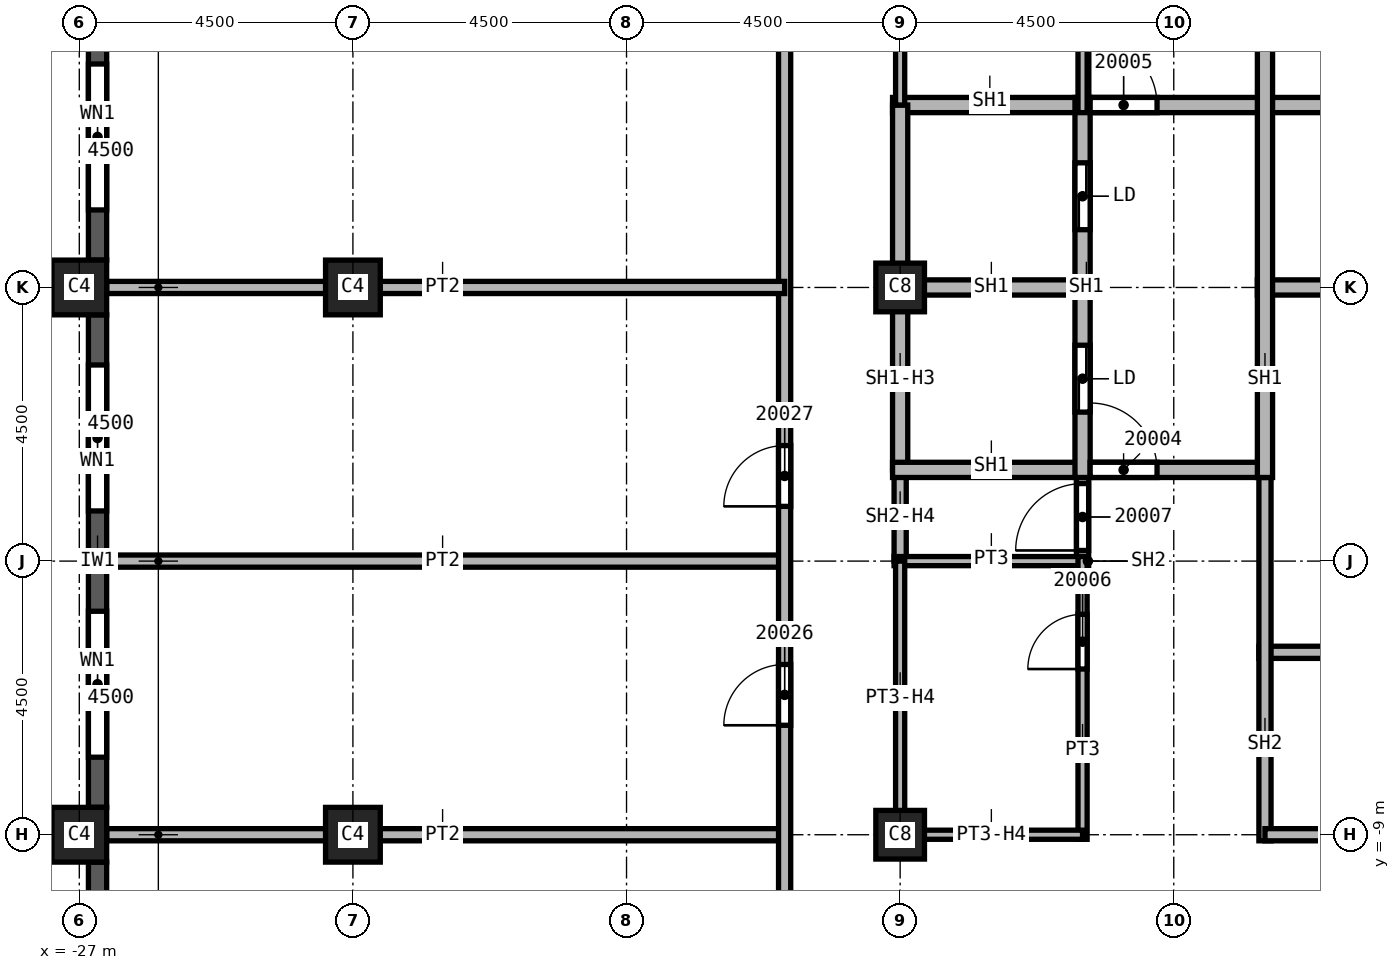
"""IFC4 building model, lengths in metres.
Left out: names, types, materials, properties, quantities, classifications, styles, units other than length and angle.
Written with IfcOpenShell. Run it as: python <this file> out.ifc"""

import sys

from ifc_helpers import new_model, si_unit, direction, frame, frame_2d, origin, origin_2d, place, context, subcontext, project, spatial, rectangle, extrude, element, fill, save


model = new_model("IFC4")
c1 = context("Model", 3, precision=1e-05, world=origin(), true_north=direction((0.0, 1.0)))
c2 = subcontext(c1, "Body", "Model", "MODEL_VIEW")
j1 = project(units=[si_unit("LENGTHUNIT", "METRE"), si_unit("PLANEANGLEUNIT", "RADIAN")], contexts=[c1])
p1 = place(None, origin())
s1 = spatial("IfcSite", under=j1, at=p1, CompositionType="ELEMENT")
p2 = place(p1, origin())
s2 = spatial("IfcBuilding", under=s1, at=p2, CompositionType="ELEMENT")
p3 = place(p2, frame((0.0, 0.0, 286.0)))
s3 = spatial("IfcBuildingStorey", under=s2, at=p3, CompositionType="ELEMENT", Elevation=286.0)
for number, where, z_axis, x_axis in (
    (1, (-22.5, 0.0, 0.0), (0.0, 0.0, 1.0), (1.0, 0.0, 0.0)),
    (2, (-22.5, -9.0, 0.0), (0.0, 0.0, 1.0), (1.0, 0.0, 0.0)),
):
    element("IfcColumn", number, at=place(p3, frame(where, z_axis=z_axis, x_axis=x_axis)), inside=s3, PredefinedType="COLUMN", context=c2, shape_type="SweptSolid", body=[
        extrude(rectangle(XDim=0.9, YDim=0.9, at=origin_2d()), origin(), (0.0, 0.0, 1.0), 3.72),
    ])
for number, where, z_axis, x_axis in (
    (3, (-13.5, 0.0, 0.0), (0.0, 0.0, 1.0), (1.0, 0.0, 0.0)),
    (4, (-13.5, -9.0, 0.0), (0.0, 0.0, 1.0), (1.0, 0.0, 0.0)),
):
    element("IfcColumn", number, at=place(p3, frame(where, z_axis=z_axis, x_axis=x_axis)), inside=s3, PredefinedType="COLUMN", context=c2, shape_type="SweptSolid", body=[
        extrude(rectangle(XDim=0.8, YDim=0.8, at=origin_2d()), origin(), (0.0, 0.0, 1.0), 3.72),
    ])
for number, where, z_axis, x_axis in (
    (5, (-27.0, 0.0, 0.0), (0.0, 0.0, 1.0), (0.0, 1.0, 0.0)),
    (6, (-27.0, -9.0, 0.0), (0.0, 0.0, 1.0), (0.0, 1.0, 0.0)),
):
    element("IfcColumn", number, at=place(p3, frame(where, z_axis=z_axis, x_axis=x_axis)), inside=s3, PredefinedType="COLUMN", context=c2, shape_type="SweptSolid", body=[
        extrude(rectangle(XDim=0.9, YDim=0.9, at=origin_2d()), origin(), (0.0, 0.0, 1.0), 3.72),
    ])
p4 = place(p3, frame((-26.7, 8.55, 0.0), z_axis=(0.0, 0.0, 1.0), x_axis=(0.0, -1.0, 0.0)))
e7 = element("IfcWall", 7, at=p4, inside=s3, PredefinedType="SOLIDWALL", context=c2, shape_type="SweptSolid", body=[
    extrude(rectangle(XDim=8.1, YDim=0.3, at=frame_2d((4.05, 0.0))), origin(), (0.0, 0.0, 1.0), 3.12),
])
p5 = place(p4, frame((0.825, 0.0, 0.8)))
e8 = element("IfcOpeningElement", 8, at=p5, cuts=e7, PredefinedType="OPENING", context=c2, shape_type="SweptSolid", body=[
    extrude(rectangle(XDim=2.4, YDim=1.95, at=frame_2d((1.2, 0.975))), frame((0.0, 0.15, 0.0), z_axis=(0.0, -1.0, 0.0), x_axis=(1.0, 0.0, 0.0)), (0.0, 0.0, 1.0), 0.3),
])
p6 = place(p4, frame((4.875, 0.0, 0.8)))
e9 = element("IfcOpeningElement", 9, at=p6, cuts=e7, PredefinedType="OPENING", context=c2, shape_type="SweptSolid", body=[
    extrude(rectangle(XDim=2.4, YDim=1.95, at=frame_2d((1.2, 0.975))), frame((0.0, 0.15, 0.0), z_axis=(0.0, -1.0, 0.0), x_axis=(1.0, 0.0, 0.0)), (0.0, 0.0, 1.0), 0.3),
])
p7 = place(p3, frame((-26.7, -0.45, 0.0), z_axis=(0.0, 0.0, 1.0), x_axis=(0.0, -1.0, 0.0)))
e10 = element("IfcWall", 10, at=p7, inside=s3, PredefinedType="SOLIDWALL", context=c2, shape_type="SweptSolid", body=[
    extrude(rectangle(XDim=8.1, YDim=0.3, at=frame_2d((4.05, 0.0))), origin(), (0.0, 0.0, 1.0), 3.12),
])
p8 = place(p7, frame((0.825, 0.0, 0.8)))
e11 = element("IfcOpeningElement", 11, at=p8, cuts=e10, PredefinedType="OPENING", context=c2, shape_type="SweptSolid", body=[
    extrude(rectangle(XDim=2.4, YDim=1.95, at=frame_2d((1.2, 0.975))), frame((0.0, 0.15, 0.0), z_axis=(0.0, -1.0, 0.0), x_axis=(1.0, 0.0, 0.0)), (0.0, 0.0, 1.0), 0.3),
])
p9 = place(p7, frame((4.875, 0.0, 0.8)))
e12 = element("IfcOpeningElement", 12, at=p9, cuts=e10, PredefinedType="OPENING", context=c2, shape_type="SweptSolid", body=[
    extrude(rectangle(XDim=2.4, YDim=1.95, at=frame_2d((1.2, 0.975))), frame((0.0, 0.15, 0.0), z_axis=(0.0, -1.0, 0.0), x_axis=(1.0, 0.0, 0.0)), (0.0, 0.0, 1.0), 0.3),
])
p10 = place(p3, frame((-26.7, -9.45, 0.0), z_axis=(0.0, 0.0, 1.0), x_axis=(0.0, -1.0, 0.0)))
e13 = element("IfcWall", 13, at=p10, inside=s3, PredefinedType="SOLIDWALL", context=c2, shape_type="SweptSolid", body=[
    extrude(rectangle(XDim=8.1, YDim=0.3, at=frame_2d((4.05, 0.0))), origin(), (0.0, 0.0, 1.0), 3.12),
])
p11 = place(p10, frame((0.825, 0.0, 0.8)))
e14 = element("IfcOpeningElement", 14, at=p11, cuts=e13, PredefinedType="OPENING", context=c2, shape_type="SweptSolid", body=[
    extrude(rectangle(XDim=2.4, YDim=1.95, at=frame_2d((1.2, 0.975))), frame((0.0, 0.15, 0.0), z_axis=(0.0, -1.0, 0.0), x_axis=(1.0, 0.0, 0.0)), (0.0, 0.0, 1.0), 0.3),
])
p12 = place(p10, frame((4.875, 0.0, 0.8)))
e15 = element("IfcOpeningElement", 15, at=p12, cuts=e13, PredefinedType="OPENING", context=c2, shape_type="SweptSolid", body=[
    extrude(rectangle(XDim=2.4, YDim=1.95, at=frame_2d((1.2, 0.975))), frame((0.0, 0.15, 0.0), z_axis=(0.0, -1.0, 0.0), x_axis=(1.0, 0.0, 0.0)), (0.0, 0.0, 1.0), 0.3),
])
for number, where, z_axis, x_axis in (
    (16, (-26.55, -9.0, 0.0), (0.0, 0.0, 1.0), (1.0, 0.0, 0.0)),
    (17, (-26.55, -4.5, 0.0), (0.0, 0.0, 1.0), (1.0, 0.0, 0.0)),
):
    element("IfcWall", number, at=place(p3, frame(where, z_axis=z_axis, x_axis=x_axis)), inside=s3, PredefinedType="PARTITIONING", context=c2, shape_type="SweptSolid", body=[
        extrude(rectangle(XDim=11.15, YDim=0.2, at=frame_2d((5.575, 0.0))), origin(), (0.0, 0.0, 1.0), 3.72),
    ])
p13 = place(p3, frame((-15.4, -21.9, 0.0), z_axis=(0.0, 0.0, 1.0), x_axis=(0.0, 1.0, 0.0)))
e18 = element("IfcWall", 18, at=p13, inside=s3, PredefinedType="PARTITIONING", context=c2, shape_type="SweptSolid", body=[
    extrude(rectangle(XDim=35.5, YDim=0.2, at=frame_2d((17.75, 0.0))), origin(), (0.0, 0.0, 1.0), 3.72),
])
p14 = place(p13, frame((30.9, 0.0, 0.0)))
e19 = element("IfcOpeningElement", 19, at=p14, cuts=e18, PredefinedType="OPENING", context=c2, shape_type="SweptSolid", body=[
    extrude(rectangle(XDim=1.0, YDim=2.1, at=frame_2d((0.5, 1.05))), frame((0.0, 0.1, 0.0), z_axis=(0.0, -1.0, 0.0), x_axis=(1.0, 0.0, 0.0)), (0.0, 0.0, 1.0), 0.2),
])
p15 = place(p13, frame((2.65, 0.0, 0.0)))
e20 = element("IfcOpeningElement", 20, at=p15, cuts=e18, PredefinedType="OPENING", context=c2, shape_type="SweptSolid", body=[
    extrude(rectangle(XDim=1.0, YDim=2.1, at=frame_2d((0.5, 1.05))), frame((0.0, 0.1, 0.0), z_axis=(0.0, -1.0, 0.0), x_axis=(1.0, 0.0, 0.0)), (0.0, 0.0, 1.0), 0.2),
])
p16 = place(p13, frame((7.65, 0.0, 0.0)))
e21 = element("IfcOpeningElement", 21, at=p16, cuts=e18, PredefinedType="OPENING", context=c2, shape_type="SweptSolid", body=[
    extrude(rectangle(XDim=1.0, YDim=2.1, at=frame_2d((0.5, 1.05))), frame((0.0, 0.1, 0.0), z_axis=(0.0, -1.0, 0.0), x_axis=(1.0, 0.0, 0.0)), (0.0, 0.0, 1.0), 0.2),
])
p17 = place(p13, frame((14.7, 0.0, 0.0)))
e22 = element("IfcOpeningElement", 22, at=p17, cuts=e18, PredefinedType="OPENING", context=c2, shape_type="SweptSolid", body=[
    extrude(rectangle(XDim=1.0, YDim=2.1, at=frame_2d((0.5, 1.05))), frame((0.0, 0.1, 0.0), z_axis=(0.0, -1.0, 0.0), x_axis=(1.0, 0.0, 0.0)), (0.0, 0.0, 1.0), 0.2),
])
p18 = place(p13, frame((18.3, 0.0, 0.0)))
e23 = element("IfcOpeningElement", 23, at=p18, cuts=e18, PredefinedType="OPENING", context=c2, shape_type="SweptSolid", body=[
    extrude(rectangle(XDim=1.0, YDim=2.1, at=frame_2d((0.5, 1.05))), frame((0.0, 0.1, 0.0), z_axis=(0.0, -1.0, 0.0), x_axis=(1.0, 0.0, 0.0)), (0.0, 0.0, 1.0), 0.2),
])
p19 = place(p3, frame((-15.4, 0.0, 0.0), z_axis=(0.0, 0.0, 1.0), x_axis=(-1.0, 0.0, 0.0)))
e24 = element("IfcWall", 24, at=p19, inside=s3, PredefinedType="PARTITIONING", context=c2, shape_type="SweptSolid", body=[
    extrude(rectangle(XDim=11.15, YDim=0.2, at=frame_2d((5.575, 0.0))), origin(), (0.0, 0.0, 1.0), 3.72),
])
p20 = place(p3, frame((-13.5, -4.5, 0.0), z_axis=(0.0, 0.0, 1.0), x_axis=(0.0, 1.0, 0.0)))
e25 = element("IfcWall", 25, at=p20, inside=s3, PredefinedType="SOLIDWALL", context=c2, shape_type="SweptSolid", body=[
    extrude(rectangle(XDim=1.5, YDim=0.2, at=frame_2d((0.75, 0.0))), origin(), (0.0, 0.0, 1.0), 3.042),
])
p21 = place(p3, frame((-10.5, -4.575, 0.0), z_axis=(0.0, 0.0, 1.0), x_axis=(0.0, 1.0, 0.0)))
e26 = element("IfcWall", 26, at=p21, inside=s3, PredefinedType="SOLIDWALL", context=c2, shape_type="SweptSolid", body=[
    extrude(rectangle(XDim=1.7, YDim=0.2, at=frame_2d((0.85, 0.0))), origin(), (0.0, 0.0, 1.0), 3.72),
])
p22 = place(p21, frame((0.25, 0.0, 0.0)))
e27 = element("IfcOpeningElement", 27, at=p22, cuts=e26, PredefinedType="OPENING", context=c2, shape_type="SweptSolid", body=[
    extrude(rectangle(XDim=1.1, YDim=2.1, at=frame_2d((0.55, 1.05))), frame((0.0, 0.1, 0.0), z_axis=(0.0, -1.0, 0.0), x_axis=(1.0, 0.0, 0.0)), (0.0, 0.0, 1.0), 0.2),
])
p23 = place(p3, frame((-7.6, -6.0, 0.0), z_axis=(0.0, 0.0, 1.0), x_axis=(1.0, 0.0, 0.0)))
e28 = element("IfcWall", 28, at=p23, inside=s3, PredefinedType="SOLIDWALL", context=c2, shape_type="SweptSolid", body=[
    extrude(rectangle(XDim=3.2, YDim=0.2, at=frame_2d((1.6, 0.0))), origin(), (0.0, 0.0, 1.0), 3.72),
])
p24 = place(p3, frame((-7.5, -9.1, 0.0), z_axis=(0.0, 0.0, 1.0), x_axis=(0.0, 1.0, 0.0)))
e29 = element("IfcWall", 29, at=p24, inside=s3, PredefinedType="SOLIDWALL", context=c2, shape_type="SweptSolid", body=[
    extrude(rectangle(XDim=6.225, YDim=0.2, at=frame_2d((3.113, 0.0))), origin(), (0.0, 0.0, 1.0), 3.72),
])
p25 = place(p3, frame((-4.5, -9.0, 0.0), z_axis=(0.0, 0.0, 1.0), x_axis=(-1.0, 0.0, 0.0)))
e30 = element("IfcWall", 30, at=p25, inside=s3, PredefinedType="SOLIDWALL", context=c2, shape_type="SweptSolid", body=[
    extrude(rectangle(XDim=3.0, YDim=0.2, at=frame_2d((1.5, 0.0))), origin(), (0.0, 0.0, 1.0), 3.042),
])
p26 = place(p3, frame((-13.625, 0.0, 0.0), z_axis=(0.0, 0.0, 1.0), x_axis=(1.0, 0.0, 0.0)))
e31 = element("IfcWall", 31, at=p26, inside=s3, PredefinedType="SOLIDWALL", context=c2, shape_type="SweptSolid", body=[
    extrude(rectangle(XDim=3.125, YDim=0.25, at=frame_2d((1.562, 0.0))), origin(), (0.0, 0.0, 1.0), 3.72),
])
p27 = place(p3, frame((-13.625, 3.0, 0.0), z_axis=(0.0, 0.0, 1.0), x_axis=(1.0, 0.0, 0.0)))
e32 = element("IfcWall", 32, at=p27, inside=s3, PredefinedType="SOLIDWALL", context=c2, shape_type="SweptSolid", body=[
    extrude(rectangle(XDim=9.25, YDim=0.25, at=frame_2d((4.625, 0.0))), origin(), (0.0, 0.0, 1.0), 3.72),
])
p28 = place(p27, frame((3.25, 0.0, 0.0)))
e33 = element("IfcOpeningElement", 33, at=p28, cuts=e32, PredefinedType="OPENING", context=c2, shape_type="SweptSolid", body=[
    extrude(rectangle(XDim=1.1, YDim=2.1, at=frame_2d((0.55, 1.05))), frame((0.0, 0.125, 0.0), z_axis=(0.0, -1.0, 0.0), x_axis=(1.0, 0.0, 0.0)), (0.0, 0.0, 1.0), 0.25),
])
p29 = place(p3, frame((-13.5, -3.0, 0.0), z_axis=(0.0, 0.0, 1.0), x_axis=(0.0, 1.0, 0.0)))
e34 = element("IfcWall", 34, at=p29, inside=s3, PredefinedType="SOLIDWALL", context=c2, shape_type="SweptSolid", body=[
    extrude(rectangle(XDim=6.0, YDim=0.25, at=frame_2d((3.0, 0.0))), origin(), (0.0, 0.0, 1.0), 3.042),
])
p30 = place(p3, frame((-13.625, -3.0, 0.0), z_axis=(0.0, 0.0, 1.0), x_axis=(1.0, 0.0, 0.0)))
e35 = element("IfcWall", 35, at=p30, inside=s3, PredefinedType="SOLIDWALL", context=c2, shape_type="SweptSolid", body=[
    extrude(rectangle(XDim=6.125, YDim=0.25, at=frame_2d((3.062, 0.0))), origin(), (0.0, 0.0, 1.0), 3.72),
])
p31 = place(p30, frame((3.25, 0.0, 0.0)))
e36 = element("IfcOpeningElement", 36, at=p31, cuts=e35, PredefinedType="OPENING", context=c2, shape_type="SweptSolid", body=[
    extrude(rectangle(XDim=1.1, YDim=2.1, at=frame_2d((0.55, 1.05))), frame((0.0, 0.125, 0.0), z_axis=(0.0, -1.0, 0.0), x_axis=(1.0, 0.0, 0.0)), (0.0, 0.0, 1.0), 0.25),
])
p32 = place(p3, frame((-10.5, -3.125, 0.0), z_axis=(0.0, 0.0, 1.0), x_axis=(0.0, 1.0, 0.0)))
e37 = element("IfcWall", 37, at=p32, inside=s3, PredefinedType="SOLIDWALL", context=c2, shape_type="SweptSolid", body=[
    extrude(rectangle(XDim=6.25, YDim=0.25, at=frame_2d((3.125, 0.0))), origin(), (0.0, 0.0, 1.0), 3.72),
])
p33 = place(p32, frame((1.075, 0.0, 0.0)))
e38 = element("IfcOpeningElement", 38, at=p33, cuts=e37, PredefinedType="OPENING", context=c2, shape_type="SweptSolid", body=[
    extrude(rectangle(XDim=1.1, YDim=2.1, at=frame_2d((0.55, 1.05))), frame((0.0, 0.125, 0.0), z_axis=(0.0, -1.0, 0.0), x_axis=(1.0, 0.0, 0.0)), (0.0, 0.0, 1.0), 0.25),
])
p34 = place(p32, frame((4.075, 0.0, 0.0)))
e39 = element("IfcOpeningElement", 39, at=p34, cuts=e37, PredefinedType="OPENING", context=c2, shape_type="SweptSolid", body=[
    extrude(rectangle(XDim=1.1, YDim=2.1, at=frame_2d((0.55, 1.05))), frame((0.0, 0.125, 0.0), z_axis=(0.0, -1.0, 0.0), x_axis=(1.0, 0.0, 0.0)), (0.0, 0.0, 1.0), 0.25),
])
p35 = place(p3, frame((-7.625, 0.0, 0.0), z_axis=(0.0, 0.0, 1.0), x_axis=(1.0, 0.0, 0.0)))
e40 = element("IfcWall", 40, at=p35, inside=s3, PredefinedType="SOLIDWALL", context=c2, shape_type="SweptSolid", body=[
    extrude(rectangle(XDim=3.25, YDim=0.25, at=frame_2d((1.625, 0.0))), origin(), (0.0, 0.0, 1.0), 3.72),
])
p36 = place(p3, frame((-7.5, -3.125, 0.0), z_axis=(0.0, 0.0, 1.0), x_axis=(0.0, 1.0, 0.0)))
e41 = element("IfcWall", 41, at=p36, inside=s3, PredefinedType="SOLIDWALL", context=c2, shape_type="SweptSolid", body=[
    extrude(rectangle(XDim=9.125, YDim=0.25, at=frame_2d((4.562, 0.0))), origin(), (0.0, 0.0, 1.0), 3.72),
])
p37 = place(p3, frame((-13.6, -4.5, 0.0), z_axis=(0.0, 0.0, 1.0), x_axis=(1.0, 0.0, 0.0)))
e42 = element("IfcWall", 42, at=p37, inside=s3, PredefinedType="PARTITIONING", context=c2, shape_type="SweptSolid", body=[
    extrude(rectangle(XDim=3.1, YDim=0.15, at=frame_2d((1.55, 0.0))), origin(), (0.0, 0.0, 1.0), 3.72),
])
p38 = place(p3, frame((-13.5, -9.075, 0.0), z_axis=(0.0, 0.0, 1.0), x_axis=(0.0, 1.0, 0.0)))
e43 = element("IfcWall", 43, at=p38, inside=s3, PredefinedType="PARTITIONING", context=c2, shape_type="SweptSolid", body=[
    extrude(rectangle(XDim=4.575, YDim=0.15, at=frame_2d((2.288, 0.0))), origin(), (0.0, 0.0, 1.0), 3.042),
])
p39 = place(p3, frame((-13.5, 3.0, 0.0), z_axis=(0.0, 0.0, 1.0), x_axis=(0.0, 1.0, 0.0)))
e44 = element("IfcWall", 44, at=p39, inside=s3, PredefinedType="PARTITIONING", context=c2, shape_type="SweptSolid", body=[
    extrude(rectangle(XDim=6.075, YDim=0.15, at=frame_2d((3.038, 0.0))), origin(), (0.0, 0.0, 1.0), 3.042),
])
p40 = place(p3, frame((-10.5, -9.075, 0.0), z_axis=(0.0, 0.0, 1.0), x_axis=(0.0, 1.0, 0.0)))
e45 = element("IfcWall", 45, at=p40, inside=s3, PredefinedType="PARTITIONING", context=c2, shape_type="SweptSolid", body=[
    extrude(rectangle(XDim=4.65, YDim=0.15, at=frame_2d((2.325, 0.0))), origin(), (0.0, 0.0, 1.0), 3.72),
])
p41 = place(p40, frame((2.8, 0.0, 0.0)))
e46 = element("IfcOpeningElement", 46, at=p41, cuts=e45, PredefinedType="OPENING", context=c2, shape_type="SweptSolid", body=[
    extrude(rectangle(XDim=0.9, YDim=2.1, at=frame_2d((0.45, 1.05))), frame((0.0, 0.075, 0.0), z_axis=(0.0, -1.0, 0.0), x_axis=(1.0, 0.0, 0.0)), (0.0, 0.0, 1.0), 0.15),
])
p42 = place(p3, frame((-10.5, -9.0, 0.0), z_axis=(0.0, 0.0, 1.0), x_axis=(-1.0, 0.0, 0.0)))
e47 = element("IfcWall", 47, at=p42, inside=s3, PredefinedType="PARTITIONING", context=c2, shape_type="SweptSolid", body=[
    extrude(rectangle(XDim=3.0, YDim=0.15, at=frame_2d((1.5, 0.0))), origin(), (0.0, 0.0, 1.0), 3.042),
])
p43 = place(p3, frame((-10.5, 2.875, 0.0), z_axis=(0.0, 0.0, 1.0), x_axis=(0.0, 1.0, 0.0)))
e48 = element("IfcWall", 48, at=p43, inside=s3, PredefinedType="PARTITIONING", context=c2, shape_type="SweptSolid", body=[
    extrude(rectangle(XDim=6.2, YDim=0.15, at=frame_2d((3.1, 0.0))), origin(), (0.0, 0.0, 1.0), 3.72),
])
p44 = place(p43, frame((1.75, 0.0, 0.0)))
e49 = element("IfcOpeningElement", 49, at=p44, cuts=e48, PredefinedType="OPENING", context=c2, shape_type="SweptSolid", body=[
    extrude(rectangle(XDim=0.9, YDim=2.1, at=frame_2d((0.45, 1.05))), frame((0.0, 0.075, 0.0), z_axis=(0.0, -1.0, 0.0), x_axis=(1.0, 0.0, 0.0)), (0.0, 0.0, 1.0), 0.15),
])
p45 = place(p6, origin())
e50 = element("IfcWindow", 50, at=p45, inside=s3, PartitioningType="SINGLE_PANEL", PredefinedType="WINDOW", context=c2, shape_type="SweptSolid", body=[
    extrude(rectangle(XDim=2.4, YDim=1.95, at=frame_2d((1.2, 0.975))), frame((0.0, 0.03, 0.0), z_axis=(0.0, -1.0, 0.0), x_axis=(1.0, 0.0, 0.0)), (0.0, 0.0, 1.0), 0.06),
])
fill(e9, e50)
p46 = place(p8, origin())
e51 = element("IfcWindow", 51, at=p46, inside=s3, PartitioningType="SINGLE_PANEL", PredefinedType="WINDOW", context=c2, shape_type="SweptSolid", body=[
    extrude(rectangle(XDim=2.4, YDim=1.95, at=frame_2d((1.2, 0.975))), frame((0.0, 0.03, 0.0), z_axis=(0.0, -1.0, 0.0), x_axis=(1.0, 0.0, 0.0)), (0.0, 0.0, 1.0), 0.06),
])
fill(e11, e51)
p47 = place(p9, origin())
e52 = element("IfcWindow", 52, at=p47, inside=s3, PartitioningType="SINGLE_PANEL", PredefinedType="WINDOW", context=c2, shape_type="SweptSolid", body=[
    extrude(rectangle(XDim=2.4, YDim=1.95, at=frame_2d((1.2, 0.975))), frame((0.0, 0.03, 0.0), z_axis=(0.0, -1.0, 0.0), x_axis=(1.0, 0.0, 0.0)), (0.0, 0.0, 1.0), 0.06),
])
fill(e12, e52)
p48 = place(p31, origin())
e53 = element("IfcDoor", 53, at=p48, inside=s3, OperationType="SINGLE_SWING_LEFT", PredefinedType="DOOR", context=c2, shape_type="SweptSolid", body=[
    extrude(rectangle(XDim=1.1, YDim=2.1, at=frame_2d((0.55, 1.05))), frame((0.0, 0.025, 0.0), z_axis=(0.0, -1.0, 0.0), x_axis=(1.0, 0.0, 0.0)), (0.0, 0.0, 1.0), 0.05),
])
fill(e36, e53)
p49 = place(p28, origin())
e54 = element("IfcDoor", 54, at=p49, inside=s3, OperationType="SINGLE_SWING_RIGHT", PredefinedType="DOOR", context=c2, shape_type="SweptSolid", body=[
    extrude(rectangle(XDim=1.1, YDim=2.1, at=frame_2d((0.55, 1.05))), frame((0.0, 0.025, 0.0), z_axis=(0.0, -1.0, 0.0), x_axis=(1.0, 0.0, 0.0)), (0.0, 0.0, 1.0), 0.05),
])
fill(e33, e54)
p50 = place(p41, origin())
e55 = element("IfcDoor", 55, at=p50, inside=s3, OperationType="SINGLE_SWING_LEFT", PredefinedType="DOOR", context=c2, shape_type="SweptSolid", body=[
    extrude(rectangle(XDim=0.9, YDim=2.1, at=frame_2d((0.45, 1.05))), frame((0.0, 0.025, 0.0), z_axis=(0.0, -1.0, 0.0), x_axis=(1.0, 0.0, 0.0)), (0.0, 0.0, 1.0), 0.05),
])
fill(e46, e55)
p51 = place(p22, origin())
e56 = element("IfcDoor", 56, at=p51, inside=s3, OperationType="SINGLE_SWING_RIGHT", PredefinedType="DOOR", context=c2, shape_type="SweptSolid", body=[
    extrude(rectangle(XDim=1.1, YDim=2.1, at=frame_2d((0.55, 1.05))), frame((0.0, 0.025, 0.0), z_axis=(0.0, -1.0, 0.0), x_axis=(1.0, 0.0, 0.0)), (0.0, 0.0, 1.0), 0.05),
])
fill(e27, e56)
p52 = place(p17, origin())
e57 = element("IfcDoor", 57, at=p52, inside=s3, OperationType="SINGLE_SWING_LEFT", PredefinedType="DOOR", context=c2, shape_type="SweptSolid", body=[
    extrude(rectangle(XDim=1.0, YDim=2.1, at=frame_2d((0.5, 1.05))), frame((0.0, 0.025, 0.0), z_axis=(0.0, -1.0, 0.0), x_axis=(1.0, 0.0, 0.0)), (0.0, 0.0, 1.0), 0.05),
])
fill(e22, e57)
p53 = place(p18, origin())
e58 = element("IfcDoor", 58, at=p53, inside=s3, OperationType="SINGLE_SWING_RIGHT", PredefinedType="DOOR", context=c2, shape_type="SweptSolid", body=[
    extrude(rectangle(XDim=1.0, YDim=2.1, at=frame_2d((0.5, 1.05))), frame((0.0, 0.025, 0.0), z_axis=(0.0, -1.0, 0.0), x_axis=(1.0, 0.0, 0.0)), (0.0, 0.0, 1.0), 0.05),
])
fill(e23, e58)
p54 = place(p33, origin())
e59 = element("IfcDoor", 59, at=p54, inside=s3, OperationType="SLIDING_TO_LEFT", PredefinedType="DOOR", context=c2, shape_type="SweptSolid", body=[
    extrude(rectangle(XDim=1.1, YDim=2.1, at=frame_2d((0.55, 1.05))), frame((0.0, 0.025, 0.0), z_axis=(0.0, -1.0, 0.0), x_axis=(1.0, 0.0, 0.0)), (0.0, 0.0, 1.0), 0.05),
])
fill(e38, e59)
p55 = place(p34, origin())
e60 = element("IfcDoor", 60, at=p55, inside=s3, OperationType="SLIDING_TO_LEFT", PredefinedType="DOOR", context=c2, shape_type="SweptSolid", body=[
    extrude(rectangle(XDim=1.1, YDim=2.1, at=frame_2d((0.55, 1.05))), frame((0.0, 0.025, 0.0), z_axis=(0.0, -1.0, 0.0), x_axis=(1.0, 0.0, 0.0)), (0.0, 0.0, 1.0), 0.05),
])
fill(e39, e60)
save(model, sys.argv[1])
